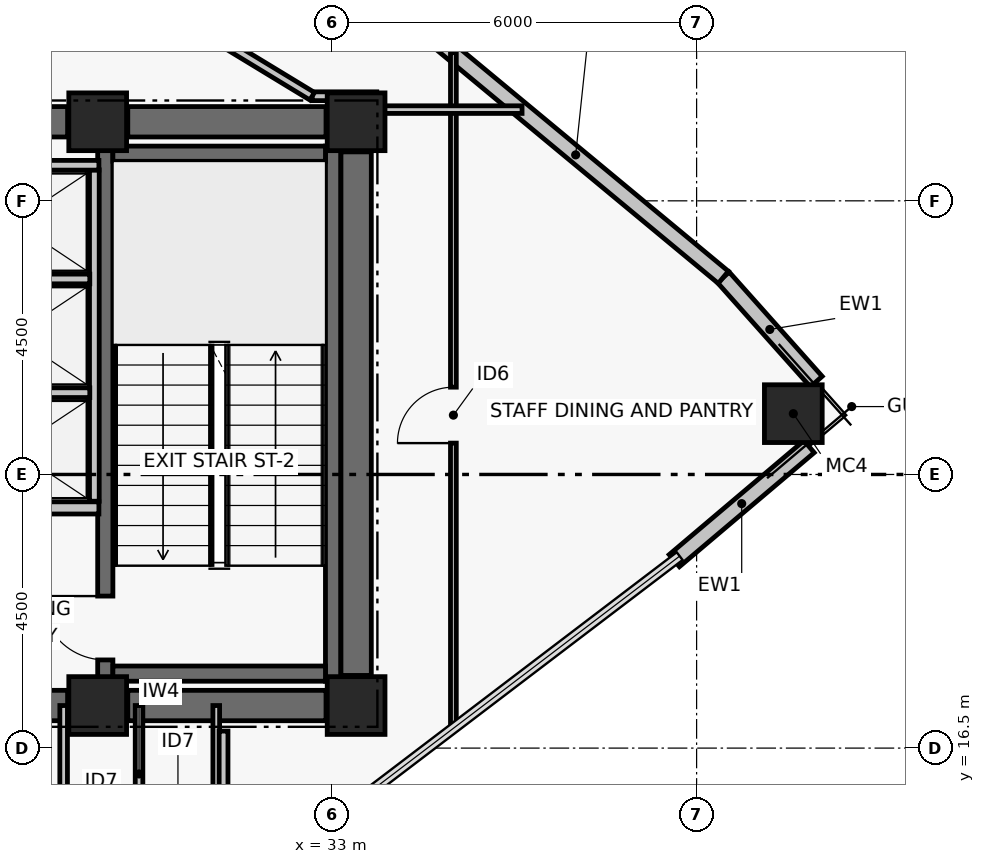
"""IFC4 building model, lengths in metres.
Left out: names, types, materials, properties, quantities, classifications, styles, units other than length and angle.
Written with IfcOpenShell. Run it as: python <this file> out.ifc"""

import sys

from ifc_helpers import new_model, si_unit, direction, frame, frame_2d, origin, origin_2d, place, context, subcontext, project, spatial, rectangle, hollow_rectangle, extrude, element, fill, save


model = new_model("IFC4")
c1 = context("Model", 3, precision=1e-05, world=origin(), true_north=direction((0.0, 1.0)))
c2 = subcontext(c1, "Body", "Model", "MODEL_VIEW")
j1 = project(units=[si_unit("LENGTHUNIT", "METRE"), si_unit("PLANEANGLEUNIT", "RADIAN")], contexts=[c1])
p1 = place(None, origin())
s1 = spatial("IfcSite", under=j1, at=p1, CompositionType="ELEMENT")
p2 = place(p1, origin())
s2 = spatial("IfcBuilding", under=s1, at=p2, CompositionType="ELEMENT")
p3 = place(p2, frame((0.0, 0.0, 180.36)))
s3 = spatial("IfcBuildingStorey", under=s2, at=p3, CompositionType="ELEMENT", Elevation=180.36)
for number, where, z_axis, x_axis in (
    (1, (29.15, 17.2, 0.0), (0.0, 0.0, 1.0), (1.0, 0.0, 0.0)),
    (2, (33.4, 17.2, 0.0), (0.0, 0.0, 1.0), (1.0, 0.0, 0.0)),
    (3, (29.15, 26.8, 0.0), (0.0, 0.0, 1.0), (1.0, 0.0, 0.0)),
    (4, (33.4, 26.8, 0.0), (0.0, 0.0, 1.0), (1.0, 0.0, 0.0)),
):
    element("IfcColumn", number, at=place(p3, frame(where, z_axis=z_axis, x_axis=x_axis)), inside=s3, PredefinedType="COLUMN", context=c2, shape_type="SweptSolid", body=[
        extrude(rectangle(XDim=0.95, YDim=0.95, at=origin_2d()), origin(), (0.0, 0.0, 1.0), 3.72),
    ])
p4 = place(p3, frame((26.85, 17.2, 0.0), z_axis=(0.0, 0.0, 1.0), x_axis=(1.0, 0.0, 0.0)))
e5 = element("IfcWall", 5, at=p4, inside=s3, PredefinedType="SHEAR", context=c2, shape_type="SweptSolid", body=[
    extrude(rectangle(XDim=1.805, YDim=0.5, at=frame_2d((0.902, 0.0))), origin(), (0.0, 0.0, 1.0), 3.5),
])
p5 = place(p3, frame((29.645, 17.2, 0.0), z_axis=(0.0, 0.0, 1.0), x_axis=(1.0, 0.0, 0.0)))
e6 = element("IfcWall", 6, at=p5, inside=s3, PredefinedType="SHEAR", context=c2, shape_type="SweptSolid", body=[
    extrude(rectangle(XDim=3.26, YDim=0.5, at=frame_2d((1.63, 0.0))), origin(), (0.0, 0.0, 1.0), 3.5),
])
p6 = place(p3, frame((26.85, 26.8, 0.0), z_axis=(0.0, 0.0, 1.0), x_axis=(1.0, 0.0, 0.0)))
e7 = element("IfcWall", 7, at=p6, inside=s3, PredefinedType="SHEAR", context=c2, shape_type="SweptSolid", body=[
    extrude(rectangle(XDim=1.805, YDim=0.5, at=frame_2d((0.902, 0.0))), origin(), (0.0, 0.0, 1.0), 3.5),
])
p7 = place(p3, frame((29.645, 26.8, 0.0), z_axis=(0.0, 0.0, 1.0), x_axis=(1.0, 0.0, 0.0)))
e8 = element("IfcWall", 8, at=p7, inside=s3, PredefinedType="SHEAR", context=c2, shape_type="SweptSolid", body=[
    extrude(rectangle(XDim=3.26, YDim=0.5, at=frame_2d((1.63, 0.0))), origin(), (0.0, 0.0, 1.0), 3.5),
])
p8 = place(p3, frame((33.4, 17.695, 0.0), z_axis=(0.0, 0.0, 1.0), x_axis=(0.0, 1.0, 0.0)))
e9 = element("IfcWall", 9, at=p8, inside=s3, PredefinedType="SHEAR", context=c2, shape_type="SweptSolid", body=[
    extrude(rectangle(XDim=8.61, YDim=0.5, at=frame_2d((4.305, 0.0))), origin(), (0.0, 0.0, 1.0), 3.5),
])
p9 = place(p3, frame((29.275, 17.6, 0.0), z_axis=(0.0, 0.0, 1.0), x_axis=(0.0, 1.0, 0.0)))
e10 = element("IfcWall", 10, at=p9, inside=s3, PredefinedType="SHEAR", context=c2, shape_type="SweptSolid", body=[
    extrude(rectangle(XDim=8.8, YDim=0.25, at=frame_2d((4.4, 0.0))), origin(), (0.0, 0.0, 1.0), 3.5),
])
p10 = place(p9, frame((0.35, 0.0, 0.0)))
e11 = element("IfcOpeningElement", 11, at=p10, cuts=e10, PredefinedType="OPENING", context=c2, shape_type="SweptSolid", body=[
    extrude(rectangle(XDim=1.05, YDim=2.08, at=frame_2d((0.525, 1.04))), frame((0.0, 0.135, 0.0), z_axis=(0.0, -1.0, 0.0), x_axis=(1.0, 0.0, 0.0)), (0.0, 0.0, 1.0), 0.27),
])
p11 = place(p3, frame((33.021, 17.6, 0.0), z_axis=(0.0, 0.0, 1.0), x_axis=(0.0, 1.0, 0.0)))
e12 = element("IfcWall", 12, at=p11, inside=s3, PredefinedType="SHEAR", context=c2, shape_type="SweptSolid", body=[
    extrude(rectangle(XDim=8.8, YDim=0.25, at=frame_2d((4.4, 0.0))), origin(), (0.0, 0.0, 1.0), 3.5),
])
for number, where, z_axis, x_axis in (
    (13, (29.4, 17.725, 0.0), (0.0, 0.0, 1.0), (1.0, 0.0, 0.0)),
    (14, (29.4, 26.275, 0.0), (0.0, 0.0, 1.0), (1.0, 0.0, 0.0)),
):
    element("IfcWall", number, at=place(p3, frame(where, z_axis=z_axis, x_axis=x_axis)), inside=s3, PredefinedType="SHEAR", context=c2, shape_type="SweptSolid", body=[
        extrude(rectangle(XDim=3.496, YDim=0.25, at=frame_2d((1.748, 0.0))), origin(), (0.0, 0.0, 1.0), 3.5),
    ])
p12 = place(p3, frame((40.591, 22.0, 0.0), z_axis=(0.0, 0.0, 1.0), x_axis=(1.0, 0.0, 0.0)))
e15 = element("IfcColumn", 15, at=p12, inside=s3, PredefinedType="COLUMN", context=c2, shape_type="SweptSolid", body=[
    extrude(hollow_rectangle(XDim=0.95, YDim=0.95, WallThickness=0.04, at=origin_2d()), origin(), (0.0, 0.0, 1.0), 3.72),
])
p13 = place(p3, frame((40.85, 21.458, 0.0), z_axis=(0.0, 0.0, 1.0), x_axis=(-0.763472391034, -0.645840466469, 0.0)))
e16 = element("IfcWall", 16, at=p13, inside=s3, PredefinedType="PARTITIONING", context=c2, shape_type="SweptSolid", body=[
    extrude(rectangle(XDim=2.904, YDim=0.26, at=frame_2d((1.452, 0.0))), origin(), (0.0, 0.0, 1.0), 3.5),
])
p14 = place(p3, frame((39.439, 24.242, 0.0), z_axis=(0.0, 0.0, 1.0), x_axis=(0.665576459686, -0.746329669993, 0.0)))
e17 = element("IfcWall", 17, at=p14, inside=s3, PredefinedType="PARTITIONING", context=c2, shape_type="SweptSolid", body=[
    extrude(rectangle(XDim=2.298, YDim=0.26, at=frame_2d((1.149, 0.0))), origin(), (0.0, 0.0, 1.0), 3.5),
])
p15 = place(p3, frame((34.583, 28.27, 0.0), z_axis=(0.0, 0.0, 1.0), x_axis=(0.769770017655, -0.638321329676, 0.0)))
e18 = element("IfcWall", 18, at=p15, inside=s3, PredefinedType="PARTITIONING", context=c2, shape_type="SweptSolid", body=[
    extrude(rectangle(XDim=6.309, YDim=0.26, at=frame_2d((3.155, 0.0))), origin(), (0.0, 0.0, 1.0), 3.5),
])
p16 = place(p3, frame((26.37, 20.45, 0.0), z_axis=(0.0, 0.0, 1.0), x_axis=(1.0, 0.0, 0.0)))
e19 = element("IfcWall", 19, at=p16, inside=s3, PredefinedType="PARTITIONING", context=c2, shape_type="SweptSolid", body=[
    extrude(rectangle(XDim=2.8, YDim=0.2, at=frame_2d((1.4, 0.0))), origin(), (0.0, 0.0, 1.0), 3.5),
])
p17 = place(p16, frame((0.78, 0.0, 0.0)))
e20 = element("IfcOpeningElement", 20, at=p17, cuts=e19, PredefinedType="OPENING", context=c2, shape_type="SweptSolid", body=[
    extrude(rectangle(XDim=1.1, YDim=2.08, at=frame_2d((0.55, 1.04))), frame((0.0, 0.11, 0.0), z_axis=(0.0, -1.0, 0.0), x_axis=(1.0, 0.0, 0.0)), (0.0, 0.0, 1.0), 0.22),
])
p18 = place(p3, frame((29.095, 20.56, 0.0), z_axis=(0.0, 0.0, 1.0), x_axis=(0.0, 1.0, 0.0)))
e21 = element("IfcWall", 21, at=p18, inside=s3, PredefinedType="PARTITIONING", context=c2, shape_type="SweptSolid", body=[
    extrude(rectangle(XDim=5.45, YDim=0.16, at=frame_2d((2.725, 0.0))), origin(), (0.0, 0.0, 1.0), 3.5),
])
p19 = place(p3, frame((26.37, 22.345, 0.0), z_axis=(0.0, 0.0, 1.0), x_axis=(1.0, 0.0, 0.0)))
e22 = element("IfcWall", 22, at=p19, inside=s3, PredefinedType="PARTITIONING", context=c2, shape_type="SweptSolid", body=[
    extrude(rectangle(XDim=2.65, YDim=0.16, at=frame_2d((1.325, 0.0))), origin(), (0.0, 0.0, 1.0), 3.5),
])
p20 = place(p3, frame((26.53, 24.215, 0.0), z_axis=(0.0, 0.0, 1.0), x_axis=(1.0, 0.0, 0.0)))
e23 = element("IfcWall", 23, at=p20, inside=s3, PredefinedType="PARTITIONING", context=c2, shape_type="SweptSolid", body=[
    extrude(rectangle(XDim=2.49, YDim=0.16, at=frame_2d((1.245, 0.0))), origin(), (0.0, 0.0, 1.0), 3.5),
])
p21 = place(p3, frame((26.34, 26.085, 0.0), z_axis=(0.0, 0.0, 1.0), x_axis=(1.0, 0.0, 0.0)))
e24 = element("IfcWall", 24, at=p21, inside=s3, PredefinedType="PARTITIONING", context=c2, shape_type="SweptSolid", body=[
    extrude(rectangle(XDim=2.83, YDim=0.16, at=frame_2d((1.415, 0.0))), origin(), (0.0, 0.0, 1.0), 3.5),
])
for number, where, z_axis, x_axis in (
    (25, (28.59, 14.95, 0.0), (0.0, 0.0, 1.0), (0.0, 1.0, 0.0)),
    (26, (29.83, 14.95, 0.0), (0.0, 0.0, 1.0), (0.0, 1.0, 0.0)),
):
    element("IfcWall", number, at=place(p3, frame(where, z_axis=z_axis, x_axis=x_axis)), inside=s3, PredefinedType="PARTITIONING", context=c2, shape_type="SweptSolid", body=[
        extrude(rectangle(XDim=2.25, YDim=0.125, at=frame_2d((1.125, 0.0))), origin(), (0.0, 0.0, 1.0), 2.63),
    ])
p22 = place(p3, frame((31.1, 14.95, 0.0), z_axis=(0.0, 0.0, 1.0), x_axis=(0.0, 1.0, 0.0)))
e27 = element("IfcWall", 27, at=p22, inside=s3, PredefinedType="PARTITIONING", context=c2, shape_type="SweptSolid", body=[
    extrude(rectangle(XDim=2.25, YDim=0.11, at=frame_2d((1.125, 0.0))), origin(), (0.0, 0.0, 1.0), 2.63),
])
p23 = place(p3, frame((31.22, 14.889, 0.0), z_axis=(0.0, 0.0, 1.0), x_axis=(0.0, 1.0, 0.0)))
e28 = element("IfcWall", 28, at=p23, inside=s3, PredefinedType="PARTITIONING", context=c2, shape_type="SweptSolid", body=[
    extrude(rectangle(XDim=1.891, YDim=0.145, at=frame_2d((0.946, 0.0))), origin(), (0.0, 0.0, 1.0), 2.63),
])
p24 = place(p3, frame((33.74, 27.22, 0.0), z_axis=(0.0, 0.0, 1.0), x_axis=(-1.0, 0.0, 0.0)))
e29 = element("IfcWall", 29, at=p24, inside=s3, PredefinedType="PARTITIONING", context=c2, shape_type="SweptSolid", body=[
    extrude(rectangle(XDim=1.062, YDim=0.145, at=frame_2d((0.531, 0.0))), origin(), (0.0, 0.0, 1.0), 2.63),
])
p25 = place(p3, frame((32.677, 27.22, 0.0), z_axis=(0.0, 0.0, 1.0), x_axis=(-0.854662977584, 0.519183199601, 0.0)))
e30 = element("IfcWall", 30, at=p25, inside=s3, PredefinedType="PARTITIONING", context=c2, shape_type="SweptSolid", body=[
    extrude(rectangle(XDim=2.982, YDim=0.145, at=frame_2d((1.491, 0.0))), origin(), (0.0, 0.0, 1.0), 2.63),
])
p26 = place(p3, frame((35.0, 16.813, 0.0), z_axis=(0.0, 0.0, 1.0), x_axis=(0.0, 1.0, 0.0)))
e31 = element("IfcWall", 31, at=p26, inside=s3, PredefinedType="PARTITIONING", context=c2, shape_type="SweptSolid", body=[
    extrude(rectangle(XDim=11.123, YDim=0.095, at=frame_2d((5.562, 0.0))), origin(), (0.0, 0.0, 1.0), 2.73),
])
p27 = place(p26, frame((4.703, 0.0, 0.0)))
e32 = element("IfcOpeningElement", 32, at=p27, cuts=e31, PredefinedType="OPENING", context=c2, shape_type="SweptSolid", body=[
    extrude(rectangle(XDim=0.92, YDim=2.05, at=frame_2d((0.46, 1.025))), frame((0.0, 0.057, 0.0), z_axis=(0.0, -1.0, 0.0), x_axis=(1.0, 0.0, 0.0)), (0.0, 0.0, 1.0), 0.115),
])
p28 = place(p3, frame((33.77, 27.0, 0.0), z_axis=(0.0, 0.0, 1.0), x_axis=(1.0, 0.0, 0.0)))
e33 = element("IfcWall", 33, at=p28, inside=s3, PredefinedType="PARTITIONING", context=c2, shape_type="SweptSolid", body=[
    extrude(rectangle(XDim=2.359, YDim=0.125, at=frame_2d((1.18, 0.0))), origin(), (0.0, 0.0, 1.0), 2.63),
])
p29 = place(p10, origin())
e34 = element("IfcDoor", 34, at=p29, inside=s3, OperationType="SINGLE_SWING_RIGHT", PredefinedType="DOOR", context=c2, shape_type="SweptSolid", body=[
    extrude(rectangle(XDim=1.05, YDim=2.08, at=frame_2d((0.525, 1.04))), frame((0.0, 0.025, 0.0), z_axis=(0.0, -1.0, 0.0), x_axis=(1.0, 0.0, 0.0)), (0.0, 0.0, 1.0), 0.05),
])
fill(e11, e34)
p30 = place(p27, origin())
e35 = element("IfcDoor", 35, at=p30, inside=s3, OperationType="SINGLE_SWING_LEFT", PredefinedType="DOOR", context=c2, shape_type="SweptSolid", body=[
    extrude(rectangle(XDim=0.92, YDim=2.05, at=frame_2d((0.46, 1.025))), frame((0.0, 0.025, 0.0), z_axis=(0.0, -1.0, 0.0), x_axis=(1.0, 0.0, 0.0)), (0.0, 0.0, 1.0), 0.05),
])
fill(e32, e35)
save(model, sys.argv[1])
